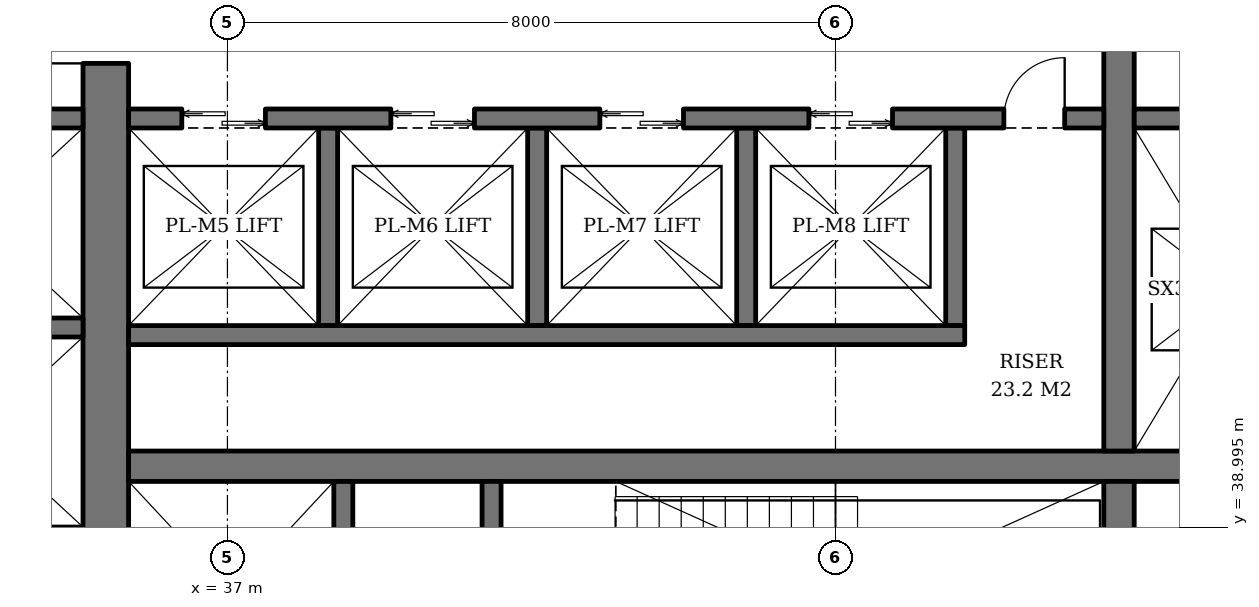
"""IFC4 building model, lengths in metres.
Left out: names, types, materials, properties, quantities, classifications, styles, units other than length and angle.
Written with IfcOpenShell. Run it as: python <this file> out.ifc"""

import sys

from ifc_helpers import new_model, si_unit, direction, frame, frame_2d, origin, place, context, subcontext, project, spatial, rectangle, extrude, element, fill, save


model = new_model("IFC4")
c1 = context("Model", 3, precision=1e-05, world=origin(), true_north=direction((0.0, 1.0)))
c2 = subcontext(c1, "Body", "Model", "MODEL_VIEW")
j1 = project(units=[si_unit("LENGTHUNIT", "METRE"), si_unit("PLANEANGLEUNIT", "RADIAN")], contexts=[c1])
p1 = place(None, origin())
s1 = spatial("IfcSite", under=j1, at=p1, CompositionType="ELEMENT")
p2 = place(p1, origin())
s2 = spatial("IfcBuilding", under=s1, at=p2, CompositionType="ELEMENT")
p3 = place(p2, frame((0.0, 0.0, 93.2)))
s3 = spatial("IfcBuildingStorey", under=s2, at=p3, CompositionType="ELEMENT", Elevation=93.2)
p4 = place(p3, frame((35.4, 36.7, 0.0), z_axis=(0.0, 0.0, 1.0), x_axis=(0.0, 1.0, 0.0)))
e1 = element("IfcWall", 1, at=p4, inside=s3, PredefinedType="SHEAR", context=c2, shape_type="SweptSolid", body=[
    extrude(rectangle(XDim=18.6, YDim=0.6, at=frame_2d((9.3, 0.0))), origin(), (0.0, 0.0, 1.0), 3.8),
])
p5 = place(p4, frame((8.4, 0.0, 0.0)))
e2 = element("IfcOpeningElement", 2, at=p5, cuts=e1, PredefinedType="OPENING", context=c2, shape_type="SweptSolid", body=[
    extrude(rectangle(XDim=1.8, YDim=2.4, at=frame_2d((0.9, 1.2))), frame((0.0, 0.31, 0.0), z_axis=(0.0, -1.0, 0.0), x_axis=(1.0, 0.0, 0.0)), (0.0, 0.0, 1.0), 0.62),
])
p6 = place(p3, frame((35.7, 39.8, 0.0), z_axis=(0.0, 0.0, 1.0), x_axis=(1.0, 0.0, 0.0)))
e3 = element("IfcWall", 3, at=p6, inside=s3, PredefinedType="SHEAR", context=c2, shape_type="SweptSolid", body=[
    extrude(rectangle(XDim=18.6, YDim=0.4, at=frame_2d((9.3, 0.0))), origin(), (0.0, 0.0, 1.0), 3.8),
])
p7 = place(p3, frame((48.73, 36.7, 0.0), z_axis=(0.0, 0.0, 1.0), x_axis=(0.0, 1.0, 0.0)))
e4 = element("IfcWall", 4, at=p7, inside=s3, PredefinedType="SHEAR", context=c2, shape_type="SweptSolid", body=[
    extrude(rectangle(XDim=2.9, YDim=0.4, at=frame_2d((1.45, 0.0))), origin(), (0.0, 0.0, 1.0), 3.8),
])
p8 = place(p3, frame((48.73, 40.0, 0.0), z_axis=(0.0, 0.0, 1.0), x_axis=(0.0, 1.0, 0.0)))
e5 = element("IfcWall", 5, at=p8, inside=s3, PredefinedType="SHEAR", context=c2, shape_type="SweptSolid", body=[
    extrude(rectangle(XDim=12.0, YDim=0.4, at=frame_2d((6.0, 0.0))), origin(), (0.0, 0.0, 1.0), 3.8),
])
p9 = place(p3, frame((38.525, 36.7, 0.0), z_axis=(0.0, 0.0, 1.0), x_axis=(0.0, 1.0, 0.0)))
e6 = element("IfcWall", 6, at=p9, inside=s3, PredefinedType="SHEAR", context=c2, shape_type="SweptSolid", body=[
    extrude(rectangle(XDim=2.9, YDim=0.25, at=frame_2d((1.45, 0.0))), origin(), (0.0, 0.0, 1.0), 3.8),
])
p10 = place(p9, frame((0.8, 0.0, 0.0)))
e7 = element("IfcOpeningElement", 7, at=p10, cuts=e6, PredefinedType="OPENING", context=c2, shape_type="SweptSolid", body=[
    extrude(rectangle(XDim=1.3, YDim=2.2, at=frame_2d((0.65, 1.1))), frame((0.0, 0.135, 0.0), z_axis=(0.0, -1.0, 0.0), x_axis=(1.0, 0.0, 0.0)), (0.0, 0.0, 1.0), 0.27),
])
p11 = place(p3, frame((40.475, 36.7, 0.0), z_axis=(0.0, 0.0, 1.0), x_axis=(0.0, 1.0, 0.0)))
e8 = element("IfcWall", 8, at=p11, inside=s3, PredefinedType="SHEAR", context=c2, shape_type="SweptSolid", body=[
    extrude(rectangle(XDim=2.9, YDim=0.25, at=frame_2d((1.45, 0.0))), origin(), (0.0, 0.0, 1.0), 3.8),
])
p12 = place(p11, frame((0.75, 0.0, 0.0)))
e9 = element("IfcOpeningElement", 9, at=p12, cuts=e8, PredefinedType="OPENING", context=c2, shape_type="SweptSolid", body=[
    extrude(rectangle(XDim=1.2, YDim=2.1, at=frame_2d((0.6, 1.05))), frame((0.0, 0.135, 0.0), z_axis=(0.0, -1.0, 0.0), x_axis=(1.0, 0.0, 0.0)), (0.0, 0.0, 1.0), 0.27),
])
for number, where, z_axis, x_axis in (
    (10, (38.325, 44.25, 0.0), (0.0, 0.0, 1.0), (0.0, -1.0, 0.0)),
    (11, (41.075, 44.25, 0.0), (0.0, 0.0, 1.0), (0.0, -1.0, 0.0)),
    (12, (43.825, 44.25, 0.0), (0.0, 0.0, 1.0), (0.0, -1.0, 0.0)),
    (13, (46.575, 44.25, 0.0), (0.0, 0.0, 1.0), (0.0, -1.0, 0.0)),
):
    element("IfcWall", number, at=place(p3, frame(where, z_axis=z_axis, x_axis=x_axis)), inside=s3, PredefinedType="SHEAR", context=c2, shape_type="SweptSolid", body=[
        extrude(rectangle(XDim=2.6, YDim=0.25, at=frame_2d((1.3, 0.0))), origin(), (0.0, 0.0, 1.0), 3.8),
    ])
p13 = place(p3, frame((35.7, 41.525, 0.0), z_axis=(0.0, 0.0, 1.0), x_axis=(1.0, 0.0, 0.0)))
e14 = element("IfcWall", 14, at=p13, inside=s3, PredefinedType="SHEAR", context=c2, shape_type="SweptSolid", body=[
    extrude(rectangle(XDim=11.0, YDim=0.25, at=frame_2d((5.5, 0.0))), origin(), (0.0, 0.0, 1.0), 3.8),
])
p14 = place(p3, frame((35.7, 44.375, 0.0), z_axis=(0.0, 0.0, 1.0), x_axis=(1.0, 0.0, 0.0)))
e15 = element("IfcWall", 15, at=p14, inside=s3, PredefinedType="SHEAR", context=c2, shape_type="SweptSolid", body=[
    extrude(rectangle(XDim=12.83, YDim=0.25, at=frame_2d((6.415, 0.0))), origin(), (0.0, 0.0, 1.0), 3.8),
])
p15 = place(p14, frame((0.7, 0.0, 0.0)))
e16 = element("IfcOpeningElement", 16, at=p15, cuts=e15, PredefinedType="OPENING", context=c2, shape_type="SweptSolid", body=[
    extrude(rectangle(XDim=1.1, YDim=2.2, at=frame_2d((0.55, 1.1))), frame((0.0, 0.135, 0.0), z_axis=(0.0, -1.0, 0.0), x_axis=(1.0, 0.0, 0.0)), (0.0, 0.0, 1.0), 0.27),
])
p16 = place(p14, frame((3.45, 0.0, 0.0)))
e17 = element("IfcOpeningElement", 17, at=p16, cuts=e15, PredefinedType="OPENING", context=c2, shape_type="SweptSolid", body=[
    extrude(rectangle(XDim=1.1, YDim=2.2, at=frame_2d((0.55, 1.1))), frame((0.0, 0.135, 0.0), z_axis=(0.0, -1.0, 0.0), x_axis=(1.0, 0.0, 0.0)), (0.0, 0.0, 1.0), 0.27),
])
p17 = place(p14, frame((6.2, 0.0, 0.0)))
e18 = element("IfcOpeningElement", 18, at=p17, cuts=e15, PredefinedType="OPENING", context=c2, shape_type="SweptSolid", body=[
    extrude(rectangle(XDim=1.1, YDim=2.2, at=frame_2d((0.55, 1.1))), frame((0.0, 0.135, 0.0), z_axis=(0.0, -1.0, 0.0), x_axis=(1.0, 0.0, 0.0)), (0.0, 0.0, 1.0), 0.27),
])
p18 = place(p14, frame((8.95, 0.0, 0.0)))
e19 = element("IfcOpeningElement", 19, at=p18, cuts=e15, PredefinedType="OPENING", context=c2, shape_type="SweptSolid", body=[
    extrude(rectangle(XDim=1.1, YDim=2.2, at=frame_2d((0.55, 1.1))), frame((0.0, 0.135, 0.0), z_axis=(0.0, -1.0, 0.0), x_axis=(1.0, 0.0, 0.0)), (0.0, 0.0, 1.0), 0.27),
])
p19 = place(p14, frame((11.515, 0.0, 0.0)))
e20 = element("IfcOpeningElement", 20, at=p19, cuts=e15, PredefinedType="OPENING", context=c2, shape_type="SweptSolid", body=[
    extrude(rectangle(XDim=0.8, YDim=2.0, at=frame_2d((0.4, 1.0))), frame((0.0, 0.135, 0.0), z_axis=(0.0, -1.0, 0.0), x_axis=(1.0, 0.0, 0.0)), (0.0, 0.0, 1.0), 0.27),
])
p20 = place(p3, frame((48.93, 44.375, 0.0), z_axis=(0.0, 0.0, 1.0), x_axis=(1.0, 0.0, 0.0)))
e21 = element("IfcWall", 21, at=p20, inside=s3, PredefinedType="SHEAR", context=c2, shape_type="SweptSolid", body=[
    extrude(rectangle(XDim=5.37, YDim=0.25, at=frame_2d((2.685, 0.0))), origin(), (0.0, 0.0, 1.0), 3.8),
])
for number, where, z_axis, x_axis in (
    (22, (32.4, 41.625, 0.0), (0.0, 0.0, 1.0), (1.0, 0.0, 0.0)),
    (23, (32.4, 44.375, 0.0), (0.0, 0.0, 1.0), (1.0, 0.0, 0.0)),
):
    element("IfcWall", number, at=place(p3, frame(where, z_axis=z_axis, x_axis=x_axis)), inside=s3, PredefinedType="SHEAR", context=c2, shape_type="SweptSolid", body=[
        extrude(rectangle(XDim=2.7, YDim=0.25, at=frame_2d((1.35, 0.0))), origin(), (0.0, 0.0, 1.0), 3.8),
    ])
p21 = place(p15, origin())
e24 = element("IfcDoor", 24, at=p21, inside=s3, OperationType="DOUBLE_DOOR_SLIDING", PredefinedType="DOOR", context=c2, shape_type="SweptSolid", body=[
    extrude(rectangle(XDim=1.1, YDim=2.2, at=frame_2d((0.55, 1.1))), frame((0.0, 0.025, 0.0), z_axis=(0.0, -1.0, 0.0), x_axis=(1.0, 0.0, 0.0)), (0.0, 0.0, 1.0), 0.05),
])
fill(e16, e24)
p22 = place(p16, origin())
e25 = element("IfcDoor", 25, at=p22, inside=s3, OperationType="DOUBLE_DOOR_SLIDING", PredefinedType="DOOR", context=c2, shape_type="SweptSolid", body=[
    extrude(rectangle(XDim=1.1, YDim=2.2, at=frame_2d((0.55, 1.1))), frame((0.0, 0.025, 0.0), z_axis=(0.0, -1.0, 0.0), x_axis=(1.0, 0.0, 0.0)), (0.0, 0.0, 1.0), 0.05),
])
fill(e17, e25)
p23 = place(p17, origin())
e26 = element("IfcDoor", 26, at=p23, inside=s3, OperationType="DOUBLE_DOOR_SLIDING", PredefinedType="DOOR", context=c2, shape_type="SweptSolid", body=[
    extrude(rectangle(XDim=1.1, YDim=2.2, at=frame_2d((0.55, 1.1))), frame((0.0, 0.025, 0.0), z_axis=(0.0, -1.0, 0.0), x_axis=(1.0, 0.0, 0.0)), (0.0, 0.0, 1.0), 0.05),
])
fill(e18, e26)
p24 = place(p18, origin())
e27 = element("IfcDoor", 27, at=p24, inside=s3, OperationType="DOUBLE_DOOR_SLIDING", PredefinedType="DOOR", context=c2, shape_type="SweptSolid", body=[
    extrude(rectangle(XDim=1.1, YDim=2.2, at=frame_2d((0.55, 1.1))), frame((0.0, 0.025, 0.0), z_axis=(0.0, -1.0, 0.0), x_axis=(1.0, 0.0, 0.0)), (0.0, 0.0, 1.0), 0.05),
])
fill(e19, e27)
p25 = place(p19, origin())
e28 = element("IfcDoor", 28, at=p25, inside=s3, OperationType="SINGLE_SWING_RIGHT", PredefinedType="DOOR", context=c2, shape_type="SweptSolid", body=[
    extrude(rectangle(XDim=0.8, YDim=2.0, at=frame_2d((0.4, 1.0))), frame((0.0, 0.025, 0.0), z_axis=(0.0, -1.0, 0.0), x_axis=(1.0, 0.0, 0.0)), (0.0, 0.0, 1.0), 0.05),
])
fill(e20, e28)
p26 = place(p5, origin())
e29 = element("IfcDoor", 29, at=p26, inside=s3, OperationType="DOUBLE_DOOR_SINGLE_SWING", PredefinedType="DOOR", context=c2, shape_type="SweptSolid", body=[
    extrude(rectangle(XDim=1.8, YDim=2.4, at=frame_2d((0.9, 1.2))), frame((0.0, 0.025, 0.0), z_axis=(0.0, -1.0, 0.0), x_axis=(1.0, 0.0, 0.0)), (0.0, 0.0, 1.0), 0.05),
])
fill(e2, e29)
save(model, sys.argv[1])
